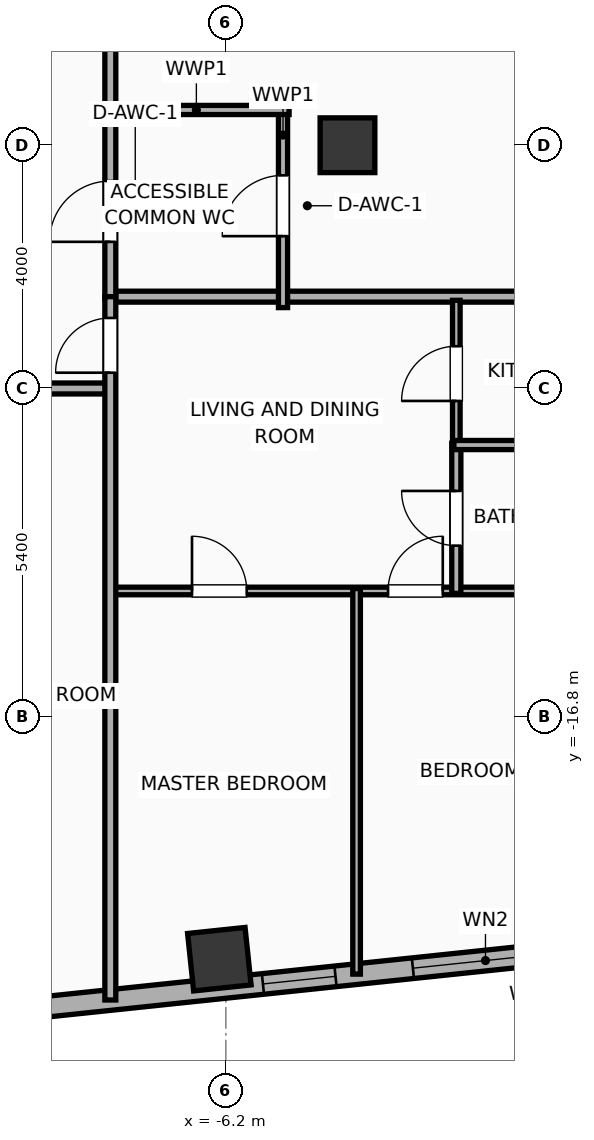
"""IFC4 building model, lengths in metres.
Left out: names, types, materials, properties, quantities, classifications, styles, units other than length and angle.
Written with IfcOpenShell. Run it as: python <this file> out.ifc"""

import sys

from ifc_helpers import new_model, si_unit, direction, frame, frame_2d, origin, origin_2d, place, context, subcontext, project, spatial, rectangle, hollow_rectangle, extrude, element, fill, save


model = new_model("IFC4")
c1 = context("Model", 3, precision=1e-05, world=origin(), true_north=direction((0.0, 1.0)))
c2 = subcontext(c1, "Body", "Model", "MODEL_VIEW")
j1 = project(units=[si_unit("LENGTHUNIT", "METRE"), si_unit("PLANEANGLEUNIT", "RADIAN")], contexts=[c1])
p1 = place(None, origin())
s1 = spatial("IfcSite", under=j1, at=p1, CompositionType="ELEMENT")
p2 = place(p1, origin())
s2 = spatial("IfcBuilding", under=s1, at=p2, CompositionType="ELEMENT")
p3 = place(p2, frame((0.0, 0.0, 152.1)))
s3 = spatial("IfcBuildingStorey", under=s2, at=p3, CompositionType="ELEMENT", Elevation=152.1)
p4 = place(p3, frame((-4.2, -7.4, 0.0), z_axis=(0.0, 0.0, 1.0), x_axis=(1.0, 0.0, 0.0)))
e1 = element("IfcColumn", 1, at=p4, inside=s3, PredefinedType="COLUMN", context=c2, shape_type="SweptSolid", body=[
    extrude(rectangle(XDim=0.9, YDim=0.9, at=origin_2d()), origin(), (0.0, 0.0, 1.0), 3.9),
])
p5 = place(p3, frame((-6.307, -20.785, 0.0), z_axis=(0.0, 0.0, 1.0), x_axis=(0.994521895368, 0.104528463268, 0.0)))
e2 = element("IfcColumn", 2, at=p5, inside=s3, PredefinedType="COLUMN", context=c2, shape_type="SweptSolid", body=[
    extrude(hollow_rectangle(XDim=0.95, YDim=0.95, WallThickness=0.032, at=origin_2d()), origin(), (0.0, 0.0, 1.0), 3.9),
])
p6 = place(p3, frame((24.756, -18.003, 0.0), z_axis=(0.0, 0.0, 1.0), x_axis=(-0.99452160744, -0.104531202687, 0.0)))
e3 = element("IfcWall", 3, at=p6, inside=s3, PredefinedType="ELEMENTEDWALL", context=c2, shape_type="SweptSolid", body=[
    extrude(rectangle(XDim=51.967, YDim=0.34, at=frame_2d((25.983, 0.0))), origin(), (0.0, 0.0, 1.0), 3.65),
])
p7 = place(p6, frame((25.633, 0.0, 0.75)))
e4 = element("IfcOpeningElement", 4, at=p7, cuts=e3, PredefinedType="OPENING", context=c2, shape_type="SweptSolid", body=[
    extrude(rectangle(XDim=2.4, YDim=2.1, at=frame_2d((1.2, 1.05))), frame((0.0, 0.18, 0.0), z_axis=(0.0, -1.0, 0.0), x_axis=(1.0, 0.0, 0.0)), (0.0, 0.0, 1.0), 0.36),
])
p8 = place(p6, frame((42.369, 0.0, 0.75)))
e5 = element("IfcOpeningElement", 5, at=p8, cuts=e3, PredefinedType="OPENING", context=c2, shape_type="SweptSolid", body=[
    extrude(rectangle(XDim=1.2, YDim=2.05, at=frame_2d((0.6, 1.025))), frame((0.0, 0.18, 0.0), z_axis=(0.0, -1.0, 0.0), x_axis=(1.0, 0.0, 0.0)), (0.0, 0.0, 1.0), 0.36),
])
p9 = place(p6, frame((34.085, 0.0, 0.75)))
e6 = element("IfcOpeningElement", 6, at=p9, cuts=e3, PredefinedType="OPENING", context=c2, shape_type="SweptSolid", body=[
    extrude(rectangle(XDim=1.2, YDim=2.05, at=frame_2d((0.6, 1.025))), frame((0.0, 0.18, 0.0), z_axis=(0.0, -1.0, 0.0), x_axis=(1.0, 0.0, 0.0)), (0.0, 0.0, 1.0), 0.36),
])
p10 = place(p6, frame((36.993, 0.0, 0.75)))
e7 = element("IfcOpeningElement", 7, at=p10, cuts=e3, PredefinedType="OPENING", context=c2, shape_type="SweptSolid", body=[
    extrude(rectangle(XDim=1.2, YDim=2.05, at=frame_2d((0.6, 1.025))), frame((0.0, 0.18, 0.0), z_axis=(0.0, -1.0, 0.0), x_axis=(1.0, 0.0, 0.0)), (0.0, 0.0, 1.0), 0.36),
])
p11 = place(p6, frame((14.397, 0.0, 0.75)))
e8 = element("IfcOpeningElement", 8, at=p11, cuts=e3, PredefinedType="OPENING", context=c2, shape_type="SweptSolid", body=[
    extrude(rectangle(XDim=1.2, YDim=2.05, at=frame_2d((0.6, 1.025))), frame((0.0, 0.18, 0.0), z_axis=(0.0, -1.0, 0.0), x_axis=(1.0, 0.0, 0.0)), (0.0, 0.0, 1.0), 0.36),
])
p12 = place(p6, frame((11.489, 0.0, 0.75)))
e9 = element("IfcOpeningElement", 9, at=p12, cuts=e3, PredefinedType="OPENING", context=c2, shape_type="SweptSolid", body=[
    extrude(rectangle(XDim=1.2, YDim=2.05, at=frame_2d((0.6, 1.025))), frame((0.0, 0.18, 0.0), z_axis=(0.0, -1.0, 0.0), x_axis=(1.0, 0.0, 0.0)), (0.0, 0.0, 1.0), 0.36),
])
p13 = place(p6, frame((8.521, 0.0, 0.75)))
e10 = element("IfcOpeningElement", 10, at=p13, cuts=e3, PredefinedType="OPENING", context=c2, shape_type="SweptSolid", body=[
    extrude(rectangle(XDim=1.2, YDim=2.05, at=frame_2d((0.6, 1.025))), frame((0.0, 0.18, 0.0), z_axis=(0.0, -1.0, 0.0), x_axis=(1.0, 0.0, 0.0)), (0.0, 0.0, 1.0), 0.36),
])
p14 = place(p6, frame((5.582, 0.0, 0.75)))
e11 = element("IfcOpeningElement", 11, at=p14, cuts=e3, PredefinedType="OPENING", context=c2, shape_type="SweptSolid", body=[
    extrude(rectangle(XDim=1.2, YDim=2.05, at=frame_2d((0.6, 1.025))), frame((0.0, 0.18, 0.0), z_axis=(0.0, -1.0, 0.0), x_axis=(1.0, 0.0, 0.0)), (0.0, 0.0, 1.0), 0.36),
])
p15 = place(p6, frame((29.313, 0.0, 0.75)))
e12 = element("IfcOpeningElement", 12, at=p15, cuts=e3, PredefinedType="OPENING", context=c2, shape_type="SweptSolid", body=[
    extrude(rectangle(XDim=1.2, YDim=2.05, at=frame_2d((0.6, 1.025))), frame((0.0, 0.18, 0.0), z_axis=(0.0, -1.0, 0.0), x_axis=(1.0, 0.0, 0.0)), (0.0, 0.0, 1.0), 0.36),
])
p16 = place(p6, frame((22.248, 0.0, 0.75)))
e13 = element("IfcOpeningElement", 13, at=p16, cuts=e3, PredefinedType="OPENING", context=c2, shape_type="SweptSolid", body=[
    extrude(rectangle(XDim=1.2, YDim=2.05, at=frame_2d((0.6, 1.025))), frame((0.0, 0.18, 0.0), z_axis=(0.0, -1.0, 0.0), x_axis=(1.0, 0.0, 0.0)), (0.0, 0.0, 1.0), 0.36),
])
p17 = place(p6, frame((18.186, 0.0, 0.75)))
e14 = element("IfcOpeningElement", 14, at=p17, cuts=e3, PredefinedType="OPENING", context=c2, shape_type="SweptSolid", body=[
    extrude(rectangle(XDim=1.2, YDim=2.05, at=frame_2d((0.6, 1.025))), frame((0.0, 0.18, 0.0), z_axis=(0.0, -1.0, 0.0), x_axis=(1.0, 0.0, 0.0)), (0.0, 0.0, 1.0), 0.36),
])
p18 = place(p6, frame((47.879, 0.0, 0.75)))
e15 = element("IfcOpeningElement", 15, at=p18, cuts=e3, PredefinedType="OPENING", context=c2, shape_type="SweptSolid", body=[
    extrude(rectangle(XDim=1.2, YDim=2.05, at=frame_2d((0.6, 1.025))), frame((0.0, 0.18, 0.0), z_axis=(0.0, -1.0, 0.0), x_axis=(1.0, 0.0, 0.0)), (0.0, 0.0, 1.0), 0.36),
])
p19 = place(p6, frame((49.844, 0.0, 0.75)))
e16 = element("IfcOpeningElement", 16, at=p19, cuts=e3, PredefinedType="OPENING", context=c2, shape_type="SweptSolid", body=[
    extrude(rectangle(XDim=1.2, YDim=2.05, at=frame_2d((0.6, 1.025))), frame((0.0, 0.18, 0.0), z_axis=(0.0, -1.0, 0.0), x_axis=(1.0, 0.0, 0.0)), (0.0, 0.0, 1.0), 0.36),
])
p20 = place(p6, frame((0.925, 0.0, 0.75)))
e17 = element("IfcOpeningElement", 17, at=p20, cuts=e3, PredefinedType="OPENING", context=c2, shape_type="SweptSolid", body=[
    extrude(rectangle(XDim=1.2, YDim=2.05, at=frame_2d((0.6, 1.025))), frame((0.0, 0.18, 0.0), z_axis=(0.0, -1.0, 0.0), x_axis=(1.0, 0.0, 0.0)), (0.0, 0.0, 1.0), 0.36),
])
p21 = place(p3, frame((-8.15, -9.89, 0.0), z_axis=(0.0, 0.0, 1.0), x_axis=(1.0, 0.0, 0.0)))
e18 = element("IfcWall", 18, at=p21, inside=s3, PredefinedType="PARTITIONING", context=c2, shape_type="SweptSolid", body=[
    extrude(rectangle(XDim=16.3, YDim=0.18, at=frame_2d((8.15, 0.0))), origin(), (0.0, 0.0, 1.0), 3.65),
])
p22 = place(p3, frame((-8.1, -9.93, 0.0), z_axis=(0.0, 0.0, 1.0), x_axis=(0.0, 1.0, 0.0)))
e19 = element("IfcWall", 19, at=p22, inside=s3, PredefinedType="PARTITIONING", context=c2, shape_type="SweptSolid", body=[
    extrude(rectangle(XDim=9.01, YDim=0.18, at=frame_2d((4.505, 0.0))), origin(), (0.0, 0.0, 1.0), 3.65),
])
p23 = place(p22, frame((0.942, 0.0, 0.0)))
e20 = element("IfcOpeningElement", 20, at=p23, cuts=e19, PredefinedType="OPENING", context=c2, shape_type="SweptSolid", body=[
    extrude(rectangle(XDim=1.0, YDim=2.05, at=frame_2d((0.5, 1.025))), frame((0.0, 0.1, 0.0), z_axis=(0.0, -1.0, 0.0), x_axis=(1.0, 0.0, 0.0)), (0.0, 0.0, 1.0), 0.2),
])
p24 = place(p3, frame((-5.26, -10.07, 0.0), z_axis=(0.0, 0.0, 1.0), x_axis=(0.0, 1.0, 0.0)))
e21 = element("IfcWall", 21, at=p24, inside=s3, PredefinedType="PLUMBINGWALL", context=c2, shape_type="SweptSolid", body=[
    extrude(rectangle(XDim=3.35, YDim=0.15, at=frame_2d((1.675, 0.0))), origin(), (0.0, 0.0, 1.0), 3.65),
])
p25 = place(p24, frame((1.175, 0.0, 0.0)))
e22 = element("IfcOpeningElement", 22, at=p25, cuts=e21, PredefinedType="OPENING", context=c2, shape_type="SweptSolid", body=[
    extrude(rectangle(XDim=1.0, YDim=2.05, at=frame_2d((0.5, 1.025))), frame((0.0, 0.085, 0.0), z_axis=(0.0, -1.0, 0.0), x_axis=(1.0, 0.0, 0.0)), (0.0, 0.0, 1.0), 0.17),
])
p26 = place(p3, frame((-8.21, -6.82, 0.0), z_axis=(0.0, 0.0, 1.0), x_axis=(1.0, 0.0, 0.0)))
e23 = element("IfcWall", 23, at=p26, inside=s3, PredefinedType="PLUMBINGWALL", context=c2, shape_type="SweptSolid", body=[
    extrude(rectangle(XDim=3.05, YDim=0.15, at=frame_2d((1.525, 0.0))), origin(), (0.0, 0.0, 1.0), 3.65),
])
p27 = place(p3, frame((-19.75, -11.4, 0.0), z_axis=(0.0, 0.0, 1.0), x_axis=(1.0, 0.0, 0.0)))
e24 = element("IfcWall", 24, at=p27, inside=s3, PredefinedType="PARTITIONING", context=c2, shape_type="SweptSolid", body=[
    extrude(rectangle(XDim=11.67, YDim=0.18, at=frame_2d((5.835, 0.0))), origin(), (0.0, 0.0, 1.0), 3.65),
])
p28 = place(p27, frame((2.664, 0.0, 0.0)))
e25 = element("IfcOpeningElement", 25, at=p28, cuts=e24, PredefinedType="OPENING", context=c2, shape_type="SweptSolid", body=[
    extrude(rectangle(XDim=0.9, YDim=2.05, at=frame_2d((0.45, 1.025))), frame((0.0, 0.1, 0.0), z_axis=(0.0, -1.0, 0.0), x_axis=(1.0, 0.0, 0.0)), (0.0, 0.0, 1.0), 0.2),
])
p29 = place(p27, frame((9.404, 0.0, 0.0)))
e26 = element("IfcOpeningElement", 26, at=p29, cuts=e24, PredefinedType="OPENING", context=c2, shape_type="SweptSolid", body=[
    extrude(rectangle(XDim=1.15, YDim=2.05, at=frame_2d((0.575, 1.025))), frame((0.0, 0.1, 0.0), z_axis=(0.0, -1.0, 0.0), x_axis=(1.0, 0.0, 0.0)), (0.0, 0.0, 1.0), 0.2),
])
p30 = place(p3, frame((-8.08, -14.73, 0.0), z_axis=(0.0, 0.0, 1.0), x_axis=(1.0, 0.0, 0.0)))
e27 = element("IfcWall", 27, at=p30, inside=s3, PredefinedType="PARTITIONING", context=c2, shape_type="SweptSolid", body=[
    extrude(rectangle(XDim=8.06, YDim=0.125, at=frame_2d((4.03, 0.0))), origin(), (0.0, 0.0, 1.0), 3.65),
])
p31 = place(p30, frame((1.323, 0.0, 0.0)))
e28 = element("IfcOpeningElement", 28, at=p31, cuts=e27, PredefinedType="OPENING", context=c2, shape_type="SweptSolid", body=[
    extrude(rectangle(XDim=0.9, YDim=2.05, at=frame_2d((0.45, 1.025))), frame((0.0, 0.073, 0.0), z_axis=(0.0, -1.0, 0.0), x_axis=(1.0, 0.0, 0.0)), (0.0, 0.0, 1.0), 0.145),
])
p32 = place(p30, frame((4.547, 0.0, 0.0)))
e29 = element("IfcOpeningElement", 29, at=p32, cuts=e27, PredefinedType="OPENING", context=c2, shape_type="SweptSolid", body=[
    extrude(rectangle(XDim=0.9, YDim=2.05, at=frame_2d((0.45, 1.025))), frame((0.0, 0.073, 0.0), z_axis=(0.0, -1.0, 0.0), x_axis=(1.0, 0.0, 0.0)), (0.0, 0.0, 1.0), 0.145),
])
p33 = place(p3, frame((-2.41, -12.36, 0.0), z_axis=(0.0, 0.0, 1.0), x_axis=(0.0, 1.0, 0.0)))
e30 = element("IfcWall", 30, at=p33, inside=s3, PredefinedType="PARTITIONING", context=c2, shape_type="SweptSolid", body=[
    extrude(rectangle(XDim=2.41, YDim=0.125, at=frame_2d((1.205, 0.0))), origin(), (0.0, 0.0, 1.0), 3.65),
])
p34 = place(p33, frame((0.755, 0.0, 0.0)))
e31 = element("IfcOpeningElement", 31, at=p34, cuts=e30, PredefinedType="OPENING", context=c2, shape_type="SweptSolid", body=[
    extrude(rectangle(XDim=0.9, YDim=2.05, at=frame_2d((0.45, 1.025))), frame((0.0, 0.073, 0.0), z_axis=(0.0, -1.0, 0.0), x_axis=(1.0, 0.0, 0.0)), (0.0, 0.0, 1.0), 0.145),
])
p35 = place(p3, frame((-2.41, -14.77, 0.0), z_axis=(0.0, 0.0, 1.0), x_axis=(0.0, 1.0, 0.0)))
e32 = element("IfcWall", 32, at=p35, inside=s3, PredefinedType="PLUMBINGWALL", context=c2, shape_type="SweptSolid", body=[
    extrude(rectangle(XDim=2.47, YDim=0.15, at=frame_2d((1.235, 0.0))), origin(), (0.0, 0.0, 1.0), 3.65),
])
p36 = place(p35, frame((0.785, 0.0, 0.0)))
e33 = element("IfcOpeningElement", 33, at=p36, cuts=e32, PredefinedType="OPENING", context=c2, shape_type="SweptSolid", body=[
    extrude(rectangle(XDim=0.9, YDim=2.05, at=frame_2d((0.45, 1.025))), frame((0.0, 0.085, 0.0), z_axis=(0.0, -1.0, 0.0), x_axis=(1.0, 0.0, 0.0)), (0.0, 0.0, 1.0), 0.17),
])
p37 = place(p3, frame((-2.45, -12.33, 0.0), z_axis=(0.0, 0.0, 1.0), x_axis=(1.0, 0.0, 0.0)))
e34 = element("IfcWall", 34, at=p37, inside=s3, PredefinedType="PLUMBINGWALL", context=c2, shape_type="SweptSolid", body=[
    extrude(rectangle(XDim=2.43, YDim=0.15, at=frame_2d((1.215, 0.0))), origin(), (0.0, 0.0, 1.0), 3.65),
])
p38 = place(p3, frame((-4.05, -21.031, 0.0), z_axis=(0.0, 0.0, 1.0), x_axis=(0.0, 1.0, 0.0)))
e35 = element("IfcWall", 35, at=p38, inside=s3, PredefinedType="PARTITIONING", context=c2, shape_type="SweptSolid", body=[
    extrude(rectangle(XDim=6.341, YDim=0.125, at=frame_2d((3.17, 0.0))), origin(), (0.0, 0.0, 1.0), 3.65),
])
p39 = place(p3, frame((-8.1, -21.456, 0.0), z_axis=(0.0, 0.0, 1.0), x_axis=(0.0, 1.0, 0.0)))
e36 = element("IfcWall", 36, at=p39, inside=s3, PredefinedType="PARTITIONING", context=c2, shape_type="SweptSolid", body=[
    extrude(rectangle(XDim=11.566, YDim=0.18, at=frame_2d((5.783, 0.0))), origin(), (0.0, 0.0, 1.0), 3.65),
])
p40 = place(p39, frame((10.316, 0.0, 0.0)))
e37 = element("IfcOpeningElement", 37, at=p40, cuts=e36, PredefinedType="OPENING", context=c2, shape_type="SweptSolid", body=[
    extrude(rectangle(XDim=0.9, YDim=2.05, at=frame_2d((0.45, 1.025))), frame((0.0, 0.1, 0.0), z_axis=(0.0, -1.0, 0.0), x_axis=(1.0, 0.0, 0.0)), (0.0, 0.0, 1.0), 0.2),
])
p41 = place(p7, origin())
e38 = element("IfcWindow", 38, at=p41, inside=s3, PartitioningType="SINGLE_PANEL", PredefinedType="WINDOW", context=c2, shape_type="SweptSolid", body=[
    extrude(rectangle(XDim=2.4, YDim=2.1, at=frame_2d((1.2, 1.05))), frame((0.0, 0.03, 0.0), z_axis=(0.0, -1.0, 0.0), x_axis=(1.0, 0.0, 0.0)), (0.0, 0.0, 1.0), 0.06),
])
fill(e4, e38)
p42 = place(p15, origin())
e39 = element("IfcWindow", 39, at=p42, inside=s3, PartitioningType="SINGLE_PANEL", PredefinedType="WINDOW", context=c2, shape_type="SweptSolid", body=[
    extrude(rectangle(XDim=1.2, YDim=2.05, at=frame_2d((0.6, 1.025))), frame((0.0, 0.03, 0.0), z_axis=(0.0, -1.0, 0.0), x_axis=(1.0, 0.0, 0.0)), (0.0, 0.0, 1.0), 0.06),
])
fill(e12, e39)
p43 = place(p23, origin())
e40 = element("IfcDoor", 40, at=p43, inside=s3, OperationType="SINGLE_SWING_LEFT", PredefinedType="DOOR", context=c2, shape_type="SweptSolid", body=[
    extrude(rectangle(XDim=1.0, YDim=2.05, at=frame_2d((0.5, 1.025))), frame((0.0, 0.025, 0.0), z_axis=(0.0, -1.0, 0.0), x_axis=(1.0, 0.0, 0.0)), (0.0, 0.0, 1.0), 0.05),
])
fill(e20, e40)
p44 = place(p25, origin())
e41 = element("IfcDoor", 41, at=p44, inside=s3, OperationType="SINGLE_SWING_LEFT", PredefinedType="DOOR", context=c2, shape_type="SweptSolid", body=[
    extrude(rectangle(XDim=1.0, YDim=2.05, at=frame_2d((0.5, 1.025))), frame((0.0, 0.025, 0.0), z_axis=(0.0, -1.0, 0.0), x_axis=(1.0, 0.0, 0.0)), (0.0, 0.0, 1.0), 0.05),
])
fill(e22, e41)
p45 = place(p31, origin())
e42 = element("IfcDoor", 42, at=p45, inside=s3, OperationType="SINGLE_SWING_LEFT", PredefinedType="DOOR", context=c2, shape_type="SweptSolid", body=[
    extrude(rectangle(XDim=0.9, YDim=2.05, at=frame_2d((0.45, 1.025))), frame((0.0, 0.025, 0.0), z_axis=(0.0, -1.0, 0.0), x_axis=(1.0, 0.0, 0.0)), (0.0, 0.0, 1.0), 0.05),
])
fill(e28, e42)
p46 = place(p32, origin())
e43 = element("IfcDoor", 43, at=p46, inside=s3, OperationType="SINGLE_SWING_RIGHT", PredefinedType="DOOR", context=c2, shape_type="SweptSolid", body=[
    extrude(rectangle(XDim=0.9, YDim=2.05, at=frame_2d((0.45, 1.025))), frame((0.0, 0.025, 0.0), z_axis=(0.0, -1.0, 0.0), x_axis=(1.0, 0.0, 0.0)), (0.0, 0.0, 1.0), 0.05),
])
fill(e29, e43)
p47 = place(p34, origin())
e44 = element("IfcDoor", 44, at=p47, inside=s3, OperationType="SINGLE_SWING_LEFT", PredefinedType="DOOR", context=c2, shape_type="SweptSolid", body=[
    extrude(rectangle(XDim=0.9, YDim=2.05, at=frame_2d((0.45, 1.025))), frame((0.0, 0.025, 0.0), z_axis=(0.0, -1.0, 0.0), x_axis=(1.0, 0.0, 0.0)), (0.0, 0.0, 1.0), 0.05),
])
fill(e31, e44)
p48 = place(p36, origin())
e45 = element("IfcDoor", 45, at=p48, inside=s3, OperationType="SINGLE_SWING_RIGHT", PredefinedType="DOOR", context=c2, shape_type="SweptSolid", body=[
    extrude(rectangle(XDim=0.9, YDim=2.05, at=frame_2d((0.45, 1.025))), frame((0.0, 0.025, 0.0), z_axis=(0.0, -1.0, 0.0), x_axis=(1.0, 0.0, 0.0)), (0.0, 0.0, 1.0), 0.05),
])
fill(e33, e45)
p49 = place(p40, origin())
e46 = element("IfcDoor", 46, at=p49, inside=s3, OperationType="SINGLE_SWING_LEFT", PredefinedType="DOOR", context=c2, shape_type="SweptSolid", body=[
    extrude(rectangle(XDim=0.9, YDim=2.05, at=frame_2d((0.45, 1.025))), frame((0.0, 0.025, 0.0), z_axis=(0.0, -1.0, 0.0), x_axis=(1.0, 0.0, 0.0)), (0.0, 0.0, 1.0), 0.05),
])
fill(e37, e46)
save(model, sys.argv[1])
